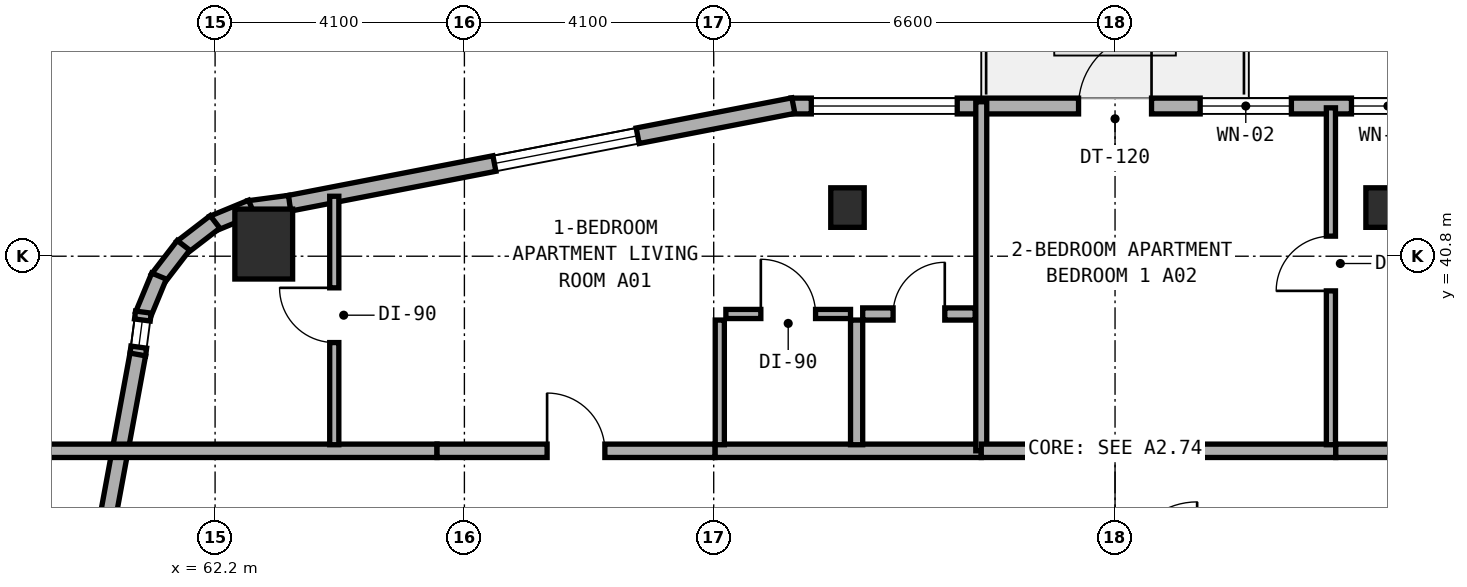
"""IFC4 building model, lengths in metres.
Left out: names, types, materials, properties, quantities, classifications, styles, units other than length and angle.
Written with IfcOpenShell. Run it as: python <this file> out.ifc"""

import sys

from ifc_helpers import new_model, si_unit, direction, frame, frame_2d, origin, origin_2d, place, context, subcontext, project, spatial, rectangle, extrude, element, fill, save


model = new_model("IFC4")
c1 = context("Model", 3, precision=1e-05, world=origin(), true_north=direction((0.0, 1.0)))
c2 = subcontext(c1, "Body", "Model", "MODEL_VIEW")
j1 = project(units=[si_unit("LENGTHUNIT", "METRE"), si_unit("PLANEANGLEUNIT", "RADIAN")], contexts=[c1])
p1 = place(None, origin())
s1 = spatial("IfcSite", under=j1, at=p1, CompositionType="ELEMENT")
p2 = place(p1, origin())
s2 = spatial("IfcBuilding", under=s1, at=p2, CompositionType="ELEMENT")
p3 = place(p2, frame((0.0, 0.0, 124.0)))
s3 = spatial("IfcBuildingStorey", under=s2, at=p3, CompositionType="ELEMENT", Elevation=124.0)
for number, where, z_axis, x_axis in (
    (1, (72.6, 41.6, 0.0), (0.0, 0.0, 1.0), (1.0, 0.0, 0.0)),
    (2, (81.4, 41.6, 0.0), (0.0, 0.0, 1.0), (1.0, 0.0, 0.0)),
):
    element("IfcColumn", number, at=place(p3, frame(where, z_axis=z_axis, x_axis=x_axis)), inside=s3, PredefinedType="COLUMN", context=c2, shape_type="SweptSolid", body=[
        extrude(rectangle(XDim=0.55, YDim=0.65, at=origin_2d()), origin(), (0.0, 0.0, 1.0), 3.5),
    ])
p4 = place(p3, frame((63.0, 41.0, 0.0), z_axis=(0.0, 0.0, 1.0), x_axis=(1.0, 0.0, 0.0)))
e3 = element("IfcColumn", 3, at=p4, inside=s3, PredefinedType="COLUMN", context=c2, shape_type="SweptSolid", body=[
    extrude(rectangle(XDim=0.95, YDim=1.15, at=origin_2d()), origin(), (0.0, 0.0, 1.0), 3.5),
])
p5 = place(p3, frame((82.365, 43.27, 0.0), z_axis=(0.0, 0.0, 1.0), x_axis=(-1.0, 0.0, 0.0)))
e4 = element("IfcWall", 4, at=p5, inside=s3, PredefinedType="STANDARD", context=c2, shape_type="SweptSolid", body=[
    extrude(rectangle(XDim=10.695, YDim=0.26, at=frame_2d((5.348, 0.0))), origin(), (0.0, 0.0, 1.0), 3.25),
])
p6 = place(p5, frame((4.765, 0.0, 0.0)))
e5 = element("IfcOpeningElement", 5, at=p6, cuts=e4, PredefinedType="OPENING", context=c2, shape_type="SweptSolid", body=[
    extrude(rectangle(XDim=1.2, YDim=2.15, at=frame_2d((0.6, 1.075))), frame((0.0, 0.14, 0.0), z_axis=(0.0, -1.0, 0.0), x_axis=(1.0, 0.0, 0.0)), (0.0, 0.0, 1.0), 0.28),
])
p7 = place(p5, frame((0.277, 0.0, 0.85)))
e6 = element("IfcOpeningElement", 6, at=p7, cuts=e4, PredefinedType="OPENING", context=c2, shape_type="SweptSolid", body=[
    extrude(rectangle(XDim=1.2, YDim=1.5, at=frame_2d((0.6, 0.75))), frame((0.0, 0.14, 0.0), z_axis=(0.0, -1.0, 0.0), x_axis=(1.0, 0.0, 0.0)), (0.0, 0.0, 1.0), 0.28),
])
p8 = place(p5, frame((2.465, 0.0, 0.85)))
e7 = element("IfcOpeningElement", 7, at=p8, cuts=e4, PredefinedType="OPENING", context=c2, shape_type="SweptSolid", body=[
    extrude(rectangle(XDim=1.5, YDim=1.5, at=frame_2d((0.75, 0.75))), frame((0.0, 0.14, 0.0), z_axis=(0.0, -1.0, 0.0), x_axis=(1.0, 0.0, 0.0)), (0.0, 0.0, 1.0), 0.28),
])
p9 = place(p5, frame((7.96, 0.0, 0.8)))
e8 = element("IfcOpeningElement", 8, at=p9, cuts=e4, PredefinedType="OPENING", context=c2, shape_type="SweptSolid", body=[
    extrude(rectangle(XDim=2.4, YDim=1.6, at=frame_2d((1.2, 0.8))), frame((0.0, 0.14, 0.0), z_axis=(0.0, -1.0, 0.0), x_axis=(1.0, 0.0, 0.0)), (0.0, 0.0, 1.0), 0.28),
])
p10 = place(p3, frame((71.71, 43.277, 0.0), z_axis=(0.0, 0.0, 1.0), x_axis=(-0.981733729692, -0.190260043057, 0.0)))
e9 = element("IfcWall", 9, at=p10, inside=s3, PredefinedType="STANDARD", context=c2, shape_type="SweptSolid", body=[
    extrude(rectangle(XDim=8.447, YDim=0.26, at=frame_2d((4.224, 0.0))), origin(), (0.0, 0.0, 1.0), 3.25),
])
p11 = place(p10, frame((2.608, 0.0, 0.8)))
e10 = element("IfcOpeningElement", 10, at=p11, cuts=e9, PredefinedType="OPENING", context=c2, shape_type="SweptSolid", body=[
    extrude(rectangle(XDim=2.4, YDim=1.6, at=frame_2d((1.2, 0.8))), frame((0.0, 0.14, 0.0), z_axis=(0.0, -1.0, 0.0), x_axis=(1.0, 0.0, 0.0)), (0.0, 0.0, 1.0), 0.28),
])
p12 = place(p3, frame((63.425, 41.672, 0.0), z_axis=(0.0, 0.0, 1.0), x_axis=(-0.991300187529, -0.13162043232, 0.0)))
e11 = element("IfcWall", 11, at=p12, inside=s3, PredefinedType="STANDARD", context=c2, shape_type="SweptSolid", body=[
    extrude(rectangle(XDim=0.677, YDim=0.26, at=frame_2d((0.338, 0.0))), origin(), (0.0, 0.0, 1.0), 3.25),
])
for number, where, z_axis, x_axis in (
    (12, (62.8, 41.601, 0.0), (0.0, 0.0, 1.0), (-0.924, -0.382, 0.0)),
    (13, (62.199, 41.364, 0.0), (0.0, 0.0, 1.0), (-0.793, -0.61, 0.0)),
    (14, (61.68, 40.979, 0.0), (0.0, 0.0, 1.0), (-0.609, -0.793, 0.0)),
):
    element("IfcWall", number, at=place(p3, frame(where, z_axis=z_axis, x_axis=x_axis)), inside=s3, PredefinedType="STANDARD", context=c2, shape_type="SweptSolid", body=[
        extrude(rectangle(XDim=0.694, YDim=0.26, at=frame_2d((0.347, 0.0))), origin(), (0.0, 0.0, 1.0), 3.25),
    ])
p13 = place(p3, frame((61.278, 40.473, 0.0), z_axis=(0.0, 0.0, 1.0), x_axis=(-0.382289608286, -0.924042561464, 0.0)))
e15 = element("IfcWall", 15, at=p13, inside=s3, PredefinedType="STANDARD", context=c2, shape_type="SweptSolid", body=[
    extrude(rectangle(XDim=0.694, YDim=0.26, at=frame_2d((0.347, 0.0))), origin(), (0.0, 0.0, 1.0), 3.25),
])
p14 = place(p3, frame((61.021, 39.881, 0.0), z_axis=(0.0, 0.0, 1.0), x_axis=(-0.130614135366, -0.991433279471, 0.0)))
e16 = element("IfcWall", 16, at=p14, inside=s3, PredefinedType="STANDARD", context=c2, shape_type="SweptSolid", body=[
    extrude(rectangle(XDim=0.712, YDim=0.26, at=frame_2d((0.356, 0.0))), origin(), (0.0, 0.0, 1.0), 3.25),
])
p15 = place(p14, frame((0.131, 0.0, 0.85)))
e17 = element("IfcOpeningElement", 17, at=p15, cuts=e16, PredefinedType="OPENING", context=c2, shape_type="SweptSolid", body=[
    extrude(rectangle(XDim=0.45, YDim=1.5, at=frame_2d((0.225, 0.75))), frame((0.0, 0.14, 0.0), z_axis=(0.0, -1.0, 0.0), x_axis=(1.0, 0.0, 0.0)), (0.0, 0.0, 1.0), 0.28),
])
p16 = place(p3, frame((60.929, 39.184, 0.0), z_axis=(0.0, 0.0, 1.0), x_axis=(-0.181209963057, -0.983444431215, 0.0)))
e18 = element("IfcWall", 18, at=p16, inside=s3, PredefinedType="STANDARD", context=c2, shape_type="SweptSolid", body=[
    extrude(rectangle(XDim=8.889, YDim=0.26, at=frame_2d((4.445, 0.0))), origin(), (0.0, 0.0, 1.0), 3.25),
])
p17 = place(p16, frame((4.214, 0.0, 0.8)))
e19 = element("IfcOpeningElement", 19, at=p17, cuts=e18, PredefinedType="OPENING", context=c2, shape_type="SweptSolid", body=[
    extrude(rectangle(XDim=2.4, YDim=1.6, at=frame_2d((1.2, 0.8))), frame((0.0, 0.14, 0.0), z_axis=(0.0, -1.0, 0.0), x_axis=(1.0, 0.0, 0.0)), (0.0, 0.0, 1.0), 0.28),
])
p18 = place(p3, frame((59.36, 37.6, 0.0), z_axis=(0.0, 0.0, 1.0), x_axis=(1.0, 0.0, 0.0)))
e20 = element("IfcWall", 20, at=p18, inside=s3, PredefinedType="SOLIDWALL", context=c2, shape_type="SweptSolid", body=[
    extrude(rectangle(XDim=6.49, YDim=0.22, at=frame_2d((3.245, 0.0))), origin(), (0.0, 0.0, 1.0), 2.945),
])
p19 = place(p3, frame((70.42, 37.6, 0.0), z_axis=(0.0, 0.0, 1.0), x_axis=(1.0, 0.0, 0.0)))
e21 = element("IfcWall", 21, at=p19, inside=s3, PredefinedType="SOLIDWALL", context=c2, shape_type="SweptSolid", body=[
    extrude(rectangle(XDim=4.38, YDim=0.22, at=frame_2d((2.19, 0.0))), origin(), (0.0, 0.0, 1.0), 2.825),
])
p20 = place(p3, frame((65.85, 37.6, 0.0), z_axis=(0.0, 0.0, 1.0), x_axis=(1.0, 0.0, 0.0)))
e22 = element("IfcWall", 22, at=p20, inside=s3, PredefinedType="SOLIDWALL", context=c2, shape_type="SweptSolid", body=[
    extrude(rectangle(XDim=4.57, YDim=0.22, at=frame_2d((2.285, 0.0))), origin(), (0.0, 0.0, 1.0), 3.22),
])
p21 = place(p20, frame((1.81, 0.0, 0.0)))
e23 = element("IfcOpeningElement", 23, at=p21, cuts=e22, PredefinedType="OPENING", context=c2, shape_type="SweptSolid", body=[
    extrude(rectangle(XDim=0.95, YDim=2.1, at=frame_2d((0.475, 1.05))), frame((0.0, 0.12, 0.0), z_axis=(0.0, -1.0, 0.0), x_axis=(1.0, 0.0, 0.0)), (0.0, 0.0, 1.0), 0.24),
])
p22 = place(p3, frame((64.16, 37.7, 0.0), z_axis=(0.0, 0.0, 1.0), x_axis=(0.0, 1.0, 0.0)))
e24 = element("IfcWall", 24, at=p22, inside=s3, PredefinedType="PARTITIONING", context=c2, shape_type="SweptSolid", body=[
    extrude(rectangle(XDim=4.086, YDim=0.15, at=frame_2d((2.043, 0.0))), origin(), (0.0, 0.0, 1.0), 2.945),
])
p23 = place(p22, frame((1.68, 0.0, 0.0)))
e25 = element("IfcOpeningElement", 25, at=p23, cuts=e24, PredefinedType="OPENING", context=c2, shape_type="SweptSolid", body=[
    extrude(rectangle(XDim=0.9, YDim=2.1, at=frame_2d((0.45, 1.05))), frame((0.0, 0.085, 0.0), z_axis=(0.0, -1.0, 0.0), x_axis=(1.0, 0.0, 0.0)), (0.0, 0.0, 1.0), 0.17),
])
p24 = place(p3, frame((72.75, 37.7, 0.0), z_axis=(0.0, 0.0, 1.0), x_axis=(0.0, 1.0, 0.0)))
e26 = element("IfcWall", 26, at=p24, inside=s3, PredefinedType="PLUMBINGWALL", context=c2, shape_type="SweptSolid", body=[
    extrude(rectangle(XDim=2.05, YDim=0.2, at=frame_2d((1.025, 0.0))), origin(), (0.0, 0.0, 1.0), 2.825),
])
p25 = place(p3, frame((70.5, 37.7, 0.0), z_axis=(0.0, 0.0, 1.0), x_axis=(0.0, 1.0, 0.0)))
e27 = element("IfcWall", 27, at=p25, inside=s3, PredefinedType="PARTITIONING", context=c2, shape_type="SweptSolid", body=[
    extrude(rectangle(XDim=2.05, YDim=0.15, at=frame_2d((1.025, 0.0))), origin(), (0.0, 0.0, 1.0), 3.22),
])
p26 = place(p3, frame((72.85, 39.85, 0.0), z_axis=(0.0, 0.0, 1.0), x_axis=(1.0, 0.0, 0.0)))
e28 = element("IfcWall", 28, at=p26, inside=s3, PredefinedType="PLUMBINGWALL", context=c2, shape_type="SweptSolid", body=[
    extrude(rectangle(XDim=1.85, YDim=0.2, at=frame_2d((0.925, 0.0))), origin(), (0.0, 0.0, 1.0), 3.22),
])
p27 = place(p26, frame((0.5, 0.0, 0.0)))
e29 = element("IfcOpeningElement", 29, at=p27, cuts=e28, PredefinedType="OPENING", context=c2, shape_type="SweptSolid", body=[
    extrude(rectangle(XDim=0.85, YDim=2.1, at=frame_2d((0.425, 1.05))), frame((0.0, 0.11, 0.0), z_axis=(0.0, -1.0, 0.0), x_axis=(1.0, 0.0, 0.0)), (0.0, 0.0, 1.0), 0.22),
])
p28 = place(p3, frame((70.6, 39.85, 0.0), z_axis=(0.0, 0.0, 1.0), x_axis=(1.0, 0.0, 0.0)))
e30 = element("IfcWall", 30, at=p28, inside=s3, PredefinedType="PARTITIONING", context=c2, shape_type="SweptSolid", body=[
    extrude(rectangle(XDim=2.05, YDim=0.15, at=frame_2d((1.025, 0.0))), origin(), (0.0, 0.0, 1.0), 2.825),
])
p29 = place(p28, frame((0.575, 0.0, 0.0)))
e31 = element("IfcOpeningElement", 31, at=p29, cuts=e30, PredefinedType="OPENING", context=c2, shape_type="SweptSolid", body=[
    extrude(rectangle(XDim=0.9, YDim=2.1, at=frame_2d((0.45, 1.05))), frame((0.0, 0.085, 0.0), z_axis=(0.0, -1.0, 0.0), x_axis=(1.0, 0.0, 0.0)), (0.0, 0.0, 1.0), 0.17),
])
p30 = place(p3, frame((74.8, 37.6, 0.0), z_axis=(0.0, 0.0, 1.0), x_axis=(0.0, 1.0, 0.0)))
e32 = element("IfcWall", 32, at=p30, inside=s3, PredefinedType="SOLIDWALL", context=c2, shape_type="SweptSolid", body=[
    extrude(rectangle(XDim=5.74, YDim=0.18, at=frame_2d((2.87, 0.0))), origin(), (0.0, 0.0, 1.0), 2.945),
])
p31 = place(p3, frame((74.8, 37.6, 0.0), z_axis=(0.0, 0.0, 1.0), x_axis=(1.0, 0.0, 0.0)))
e33 = element("IfcWall", 33, at=p31, inside=s3, PredefinedType="SOLIDWALL", context=c2, shape_type="SweptSolid", body=[
    extrude(rectangle(XDim=5.83, YDim=0.22, at=frame_2d((2.915, 0.0))), origin(), (0.0, 0.0, 1.0), 3.22),
])
p32 = place(p3, frame((80.63, 37.6, 0.0), z_axis=(0.0, 0.0, 1.0), x_axis=(1.0, 0.0, 0.0)))
e34 = element("IfcWall", 34, at=p32, inside=s3, PredefinedType="SOLIDWALL", context=c2, shape_type="SweptSolid", body=[
    extrude(rectangle(XDim=3.88, YDim=0.22, at=frame_2d((1.94, 0.0))), origin(), (0.0, 0.0, 1.0), 2.825),
])
p33 = place(p32, frame((1.465, 0.0, 0.0)))
e35 = element("IfcOpeningElement", 35, at=p33, cuts=e34, PredefinedType="OPENING", context=c2, shape_type="SweptSolid", body=[
    extrude(rectangle(XDim=0.95, YDim=2.1, at=frame_2d((0.475, 1.05))), frame((0.0, 0.12, 0.0), z_axis=(0.0, -1.0, 0.0), x_axis=(1.0, 0.0, 0.0)), (0.0, 0.0, 1.0), 0.24),
])
p34 = place(p3, frame((80.55, 37.7, 0.0), z_axis=(0.0, 0.0, 1.0), x_axis=(0.0, 1.0, 0.0)))
e36 = element("IfcWall", 36, at=p34, inside=s3, PredefinedType="PARTITIONING", context=c2, shape_type="SweptSolid", body=[
    extrude(rectangle(XDim=5.54, YDim=0.15, at=frame_2d((2.77, 0.0))), origin(), (0.0, 0.0, 1.0), 2.945),
])
p35 = place(p34, frame((2.53, 0.0, 0.0)))
e37 = element("IfcOpeningElement", 37, at=p35, cuts=e36, PredefinedType="OPENING", context=c2, shape_type="SweptSolid", body=[
    extrude(rectangle(XDim=0.9, YDim=2.1, at=frame_2d((0.45, 1.05))), frame((0.0, 0.085, 0.0), z_axis=(0.0, -1.0, 0.0), x_axis=(1.0, 0.0, 0.0)), (0.0, 0.0, 1.0), 0.17),
])
p36 = place(p6, frame((1.2, 0.0, 0.0), z_axis=(0.0, 0.0, 1.0), x_axis=(-1.0, 0.0, 0.0)))
e38 = element("IfcDoor", 38, at=p36, inside=s3, OperationType="SINGLE_SWING_RIGHT", PredefinedType="DOOR", context=c2, shape_type="SweptSolid", body=[
    extrude(rectangle(XDim=1.2, YDim=2.15, at=frame_2d((0.6, 1.075))), frame((0.0, 0.025, 0.0), z_axis=(0.0, -1.0, 0.0), x_axis=(1.0, 0.0, 0.0)), (0.0, 0.0, 1.0), 0.05),
])
fill(e5, e38)
p37 = place(p7, origin())
e39 = element("IfcWindow", 39, at=p37, inside=s3, PartitioningType="SINGLE_PANEL", PredefinedType="WINDOW", context=c2, shape_type="SweptSolid", body=[
    extrude(rectangle(XDim=1.2, YDim=1.5, at=frame_2d((0.6, 0.75))), frame((0.0, 0.03, 0.0), z_axis=(0.0, -1.0, 0.0), x_axis=(1.0, 0.0, 0.0)), (0.0, 0.0, 1.0), 0.06),
])
fill(e6, e39)
p38 = place(p8, origin())
e40 = element("IfcWindow", 40, at=p38, inside=s3, PartitioningType="SINGLE_PANEL", PredefinedType="WINDOW", context=c2, shape_type="SweptSolid", body=[
    extrude(rectangle(XDim=1.5, YDim=1.5, at=frame_2d((0.75, 0.75))), frame((0.0, 0.03, 0.0), z_axis=(0.0, -1.0, 0.0), x_axis=(1.0, 0.0, 0.0)), (0.0, 0.0, 1.0), 0.06),
])
fill(e7, e40)
p39 = place(p9, origin())
e41 = element("IfcWindow", 41, at=p39, inside=s3, PartitioningType="SINGLE_PANEL", PredefinedType="WINDOW", context=c2, shape_type="SweptSolid", body=[
    extrude(rectangle(XDim=2.4, YDim=1.6, at=frame_2d((1.2, 0.8))), frame((0.0, 0.03, 0.0), z_axis=(0.0, -1.0, 0.0), x_axis=(1.0, 0.0, 0.0)), (0.0, 0.0, 1.0), 0.06),
])
fill(e8, e41)
p40 = place(p11, origin())
e42 = element("IfcWindow", 42, at=p40, inside=s3, PartitioningType="SINGLE_PANEL", PredefinedType="WINDOW", context=c2, shape_type="SweptSolid", body=[
    extrude(rectangle(XDim=2.4, YDim=1.6, at=frame_2d((1.2, 0.8))), frame((0.0, 0.03, 0.0), z_axis=(0.0, -1.0, 0.0), x_axis=(1.0, 0.0, 0.0)), (0.0, 0.0, 1.0), 0.06),
])
fill(e10, e42)
p41 = place(p15, origin())
e43 = element("IfcWindow", 43, at=p41, inside=s3, PartitioningType="SINGLE_PANEL", PredefinedType="WINDOW", context=c2, shape_type="SweptSolid", body=[
    extrude(rectangle(XDim=0.45, YDim=1.5, at=frame_2d((0.225, 0.75))), frame((0.0, 0.03, 0.0), z_axis=(0.0, -1.0, 0.0), x_axis=(1.0, 0.0, 0.0)), (0.0, 0.0, 1.0), 0.06),
])
fill(e17, e43)
p42 = place(p21, origin())
e44 = element("IfcDoor", 44, at=p42, inside=s3, OperationType="SINGLE_SWING_LEFT", PredefinedType="DOOR", context=c2, shape_type="SweptSolid", body=[
    extrude(rectangle(XDim=0.95, YDim=2.1, at=frame_2d((0.475, 1.05))), frame((0.0, 0.025, 0.0), z_axis=(0.0, -1.0, 0.0), x_axis=(1.0, 0.0, 0.0)), (0.0, 0.0, 1.0), 0.05),
])
fill(e23, e44)
p43 = place(p23, origin())
e45 = element("IfcDoor", 45, at=p43, inside=s3, OperationType="SINGLE_SWING_RIGHT", PredefinedType="DOOR", context=c2, shape_type="SweptSolid", body=[
    extrude(rectangle(XDim=0.9, YDim=2.1, at=frame_2d((0.45, 1.05))), frame((0.0, 0.025, 0.0), z_axis=(0.0, -1.0, 0.0), x_axis=(1.0, 0.0, 0.0)), (0.0, 0.0, 1.0), 0.05),
])
fill(e25, e45)
p44 = place(p27, origin())
e46 = element("IfcDoor", 46, at=p44, inside=s3, OperationType="SINGLE_SWING_RIGHT", PredefinedType="DOOR", context=c2, shape_type="SweptSolid", body=[
    extrude(rectangle(XDim=0.85, YDim=2.1, at=frame_2d((0.425, 1.05))), frame((0.0, 0.025, 0.0), z_axis=(0.0, -1.0, 0.0), x_axis=(1.0, 0.0, 0.0)), (0.0, 0.0, 1.0), 0.05),
])
fill(e29, e46)
p45 = place(p29, origin())
e47 = element("IfcDoor", 47, at=p45, inside=s3, OperationType="SINGLE_SWING_LEFT", PredefinedType="DOOR", context=c2, shape_type="SweptSolid", body=[
    extrude(rectangle(XDim=0.9, YDim=2.1, at=frame_2d((0.45, 1.05))), frame((0.0, 0.025, 0.0), z_axis=(0.0, -1.0, 0.0), x_axis=(1.0, 0.0, 0.0)), (0.0, 0.0, 1.0), 0.05),
])
fill(e31, e47)
p46 = place(p35, origin())
e48 = element("IfcDoor", 48, at=p46, inside=s3, OperationType="SINGLE_SWING_LEFT", PredefinedType="DOOR", context=c2, shape_type="SweptSolid", body=[
    extrude(rectangle(XDim=0.9, YDim=2.1, at=frame_2d((0.45, 1.05))), frame((0.0, 0.025, 0.0), z_axis=(0.0, -1.0, 0.0), x_axis=(1.0, 0.0, 0.0)), (0.0, 0.0, 1.0), 0.05),
])
fill(e37, e48)
save(model, sys.argv[1])
